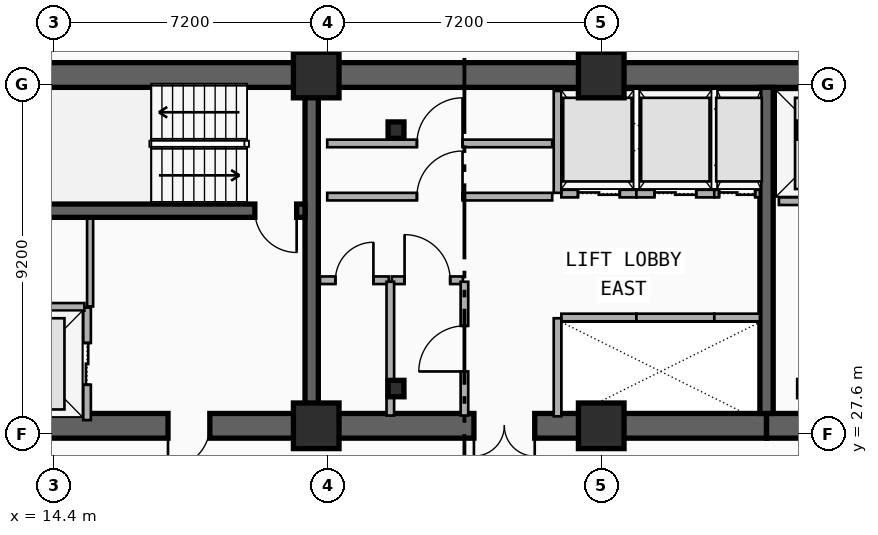
"""IFC4 building model, lengths in metres.
Left out: names, types, materials, properties, quantities, classifications, styles, units other than length and angle.
Written with IfcOpenShell. Run it as: python <this file> out.ifc"""

import sys

from ifc_helpers import new_model, si_unit, direction, frame, frame_2d, origin, origin_2d, place, context, subcontext, project, spatial, rectangle, i_section, extrude, element, fill, save


model = new_model("IFC4")
c1 = context("Model", 3, precision=1e-05, world=origin(), true_north=direction((0.0, 1.0)))
c2 = subcontext(c1, "Body", "Model", "MODEL_VIEW")
j1 = project(units=[si_unit("LENGTHUNIT", "METRE"), si_unit("PLANEANGLEUNIT", "RADIAN")], contexts=[c1])
p1 = place(None, origin())
s1 = spatial("IfcSite", under=j1, at=p1, CompositionType="ELEMENT")
p2 = place(p1, origin())
s2 = spatial("IfcBuilding", under=s1, at=p2, CompositionType="ELEMENT")
p3 = place(p2, frame((0.0, 0.0, 104.8)))
s3 = spatial("IfcBuildingStorey", under=s2, at=p3, CompositionType="ELEMENT", Elevation=104.8)
p4 = place(p3, frame((12.15, 37.05, 0.0), z_axis=(0.0, 0.0, 1.0), x_axis=(1.0, 0.0, 0.0)))
e1 = element("IfcWall", 1, at=p4, inside=s3, PredefinedType="SHEAR", context=c2, shape_type="SweptSolid", body=[
    extrude(rectangle(XDim=33.23, YDim=0.65, at=frame_2d((16.615, 0.0))), origin(), (0.0, 0.0, 1.0), 3.5),
])
p5 = place(p3, frame((21.18, 27.82, 0.0), z_axis=(0.0, 0.0, 1.0), x_axis=(-1.0, 0.0, 0.0)))
e2 = element("IfcWall", 2, at=p5, inside=s3, PredefinedType="SHEAR", context=c2, shape_type="SweptSolid", body=[
    extrude(rectangle(XDim=9.03, YDim=0.65, at=frame_2d((4.515, 0.0))), origin(), (0.0, 0.0, 1.0), 3.5),
])
p6 = place(p5, frame((2.68, 0.0, 0.0)))
e3 = element("IfcOpeningElement", 3, at=p6, cuts=e2, PredefinedType="OPENING", context=c2, shape_type="SweptSolid", body=[
    extrude(rectangle(XDim=1.1, YDim=2.15, at=frame_2d((0.55, 1.075))), frame((0.0, 0.335, 0.0), z_axis=(0.0, -1.0, 0.0), x_axis=(1.0, 0.0, 0.0)), (0.0, 0.0, 1.0), 0.67),
])
p7 = place(p3, frame((33.15, 27.82, 0.0), z_axis=(0.0, 0.0, 1.0), x_axis=(-1.0, 0.0, 0.0)))
e4 = element("IfcWall", 4, at=p7, inside=s3, PredefinedType="SHEAR", context=c2, shape_type="SweptSolid", body=[
    extrude(rectangle(XDim=11.97, YDim=0.65, at=frame_2d((5.985, 0.0))), origin(), (0.0, 0.0, 1.0), 3.5),
])
p8 = place(p7, frame((6.1, 0.0, 0.0)))
e5 = element("IfcOpeningElement", 5, at=p8, cuts=e4, PredefinedType="OPENING", context=c2, shape_type="SweptSolid", body=[
    extrude(rectangle(XDim=1.6, YDim=2.2, at=frame_2d((0.8, 1.1))), frame((0.0, 0.335, 0.0), z_axis=(0.0, -1.0, 0.0), x_axis=(1.0, 0.0, 0.0)), (0.0, 0.0, 1.0), 0.67),
])
p9 = place(p3, frame((45.38, 27.82, 0.0), z_axis=(0.0, 0.0, 1.0), x_axis=(-1.0, 0.0, 0.0)))
e6 = element("IfcWall", 6, at=p9, inside=s3, PredefinedType="SHEAR", context=c2, shape_type="SweptSolid", body=[
    extrude(rectangle(XDim=12.23, YDim=0.65, at=frame_2d((6.115, 0.0))), origin(), (0.0, 0.0, 1.0), 3.5),
])
p10 = place(p9, frame((9.93, 0.0, 0.0)))
e7 = element("IfcOpeningElement", 7, at=p10, cuts=e6, PredefinedType="OPENING", context=c2, shape_type="SweptSolid", body=[
    extrude(rectangle(XDim=1.1, YDim=2.15, at=frame_2d((0.55, 1.075))), frame((0.0, 0.335, 0.0), z_axis=(0.0, -1.0, 0.0), x_axis=(1.0, 0.0, 0.0)), (0.0, 0.0, 1.0), 0.67),
])
p11 = place(p9, frame((6.23, 0.0, 0.0)))
e8 = element("IfcOpeningElement", 8, at=p11, cuts=e6, PredefinedType="OPENING", context=c2, shape_type="SweptSolid", body=[
    extrude(rectangle(XDim=1.1, YDim=2.15, at=frame_2d((0.55, 1.075))), frame((0.0, 0.335, 0.0), z_axis=(0.0, -1.0, 0.0), x_axis=(1.0, 0.0, 0.0)), (0.0, 0.0, 1.0), 0.67),
])
for number, where, z_axis, x_axis in (
    (9, (21.18, 28.145, 0.0), (0.0, 0.0, 1.0), (0.0, 1.0, 0.0)),
    (10, (33.15, 28.145, 0.0), (0.0, 0.0, 1.0), (0.0, 1.0, 0.0)),
):
    element("IfcWall", number, at=place(p3, frame(where, z_axis=z_axis, x_axis=x_axis)), inside=s3, PredefinedType="SHEAR", context=c2, shape_type="SweptSolid", body=[
        extrude(rectangle(XDim=8.58, YDim=0.35, at=frame_2d((4.29, 0.0))), origin(), (0.0, 0.0, 1.0), 3.5),
    ])
p12 = place(p3, frame((21.005, 33.48, 0.0), z_axis=(0.0, 0.0, 1.0), x_axis=(-1.0, 0.0, 0.0)))
e11 = element("IfcWall", 11, at=p12, inside=s3, PredefinedType="SHEAR", context=c2, shape_type="SweptSolid", body=[
    extrude(rectangle(XDim=8.53, YDim=0.35, at=frame_2d((4.265, 0.0))), origin(), (0.0, 0.0, 1.0), 3.5),
])
p13 = place(p12, frame((0.22, 0.0, 0.0)))
e12 = element("IfcOpeningElement", 12, at=p13, cuts=e11, PredefinedType="OPENING", context=c2, shape_type="SweptSolid", body=[
    extrude(rectangle(XDim=1.1, YDim=2.15, at=frame_2d((0.55, 1.075))), frame((0.0, 0.185, 0.0), z_axis=(0.0, -1.0, 0.0), x_axis=(1.0, 0.0, 0.0)), (0.0, 0.0, 1.0), 0.37),
])
for number, where, z_axis, x_axis in (
    (13, (23.4, 28.8, 0.0), (0.0, 0.0, 1.0), (1.0, 0.0, 0.0)),
    (14, (23.4, 35.6, 0.0), (0.0, 0.0, 1.0), (1.0, 0.0, 0.0)),
):
    element("IfcColumn", number, at=place(p3, frame(where, z_axis=z_axis, x_axis=x_axis)), inside=s3, PredefinedType="COLUMN", context=c2, shape_type="SweptSolid", body=[
        extrude(i_section(OverallWidth=0.418, OverallDepth=0.432, WebThickness=0.035, FlangeThickness=0.056, FilletRadius=0.015, at=origin_2d()), origin(), (0.0, 0.0, 1.0), 3.5),
    ])
for number, where, z_axis, x_axis in (
    (15, (21.3, 27.82, 0.0), (0.0, 0.0, 1.0), (1.0, 0.0, 0.0)),
    (16, (21.3, 37.05, 0.0), (0.0, 0.0, 1.0), (1.0, 0.0, 0.0)),
    (17, (28.8, 27.82, 0.0), (0.0, 0.0, 1.0), (1.0, 0.0, 0.0)),
    (18, (28.8, 37.05, 0.0), (0.0, 0.0, 1.0), (1.0, 0.0, 0.0)),
):
    element("IfcColumn", number, at=place(p3, frame(where, z_axis=z_axis, x_axis=x_axis)), inside=s3, PredefinedType="COLUMN", context=c2, shape_type="SweptSolid", body=[
        extrude(rectangle(XDim=1.2, YDim=1.2, at=origin_2d()), origin(), (0.0, 0.0, 1.0), 3.5),
    ])
p14 = place(p3, frame((15.27, 27.97, 0.0), z_axis=(0.0, 0.0, 1.0), x_axis=(0.0, 1.0, 0.0)))
e19 = element("IfcWall", 19, at=p14, inside=s3, PredefinedType="PARTITIONING", context=c2, shape_type="SweptSolid", body=[
    extrude(rectangle(XDim=2.96, YDim=0.2, at=frame_2d((1.48, 0.0))), origin(), (0.0, 0.0, 1.0), 2.212),
])
p15 = place(p14, frame((0.93, 0.0, 0.0)))
e20 = element("IfcOpeningElement", 20, at=p15, cuts=e19, PredefinedType="OPENING", context=c2, shape_type="SweptSolid", body=[
    extrude(rectangle(XDim=1.1, YDim=2.15, at=frame_2d((0.55, 1.075))), frame((0.0, 0.11, 0.0), z_axis=(0.0, -1.0, 0.0), x_axis=(1.0, 0.0, 0.0)), (0.0, 0.0, 1.0), 0.22),
])
p16 = place(p3, frame((12.45, 30.95, 0.0), z_axis=(0.0, 0.0, 1.0), x_axis=(1.0, 0.0, 0.0)))
e21 = element("IfcWall", 21, at=p16, inside=s3, PredefinedType="PARTITIONING", context=c2, shape_type="SweptSolid", body=[
    extrude(rectangle(XDim=2.75, YDim=0.2, at=frame_2d((1.375, 0.0))), origin(), (0.0, 0.0, 1.0), 2.212),
])
p17 = place(p3, frame((33.475, 33.73, 0.0), z_axis=(0.0, 0.0, 1.0), x_axis=(1.0, 0.0, 0.0)))
e22 = element("IfcWall", 22, at=p17, inside=s3, PredefinedType="PARTITIONING", context=c2, shape_type="SweptSolid", body=[
    extrude(rectangle(XDim=2.725, YDim=0.2, at=frame_2d((1.362, 0.0))), origin(), (0.0, 0.0, 1.0), 2.212),
])
p18 = place(p17, frame((0.812, 0.0, 0.0)))
e23 = element("IfcOpeningElement", 23, at=p18, cuts=e22, PredefinedType="OPENING", context=c2, shape_type="SweptSolid", body=[
    extrude(rectangle(XDim=1.1, YDim=2.15, at=frame_2d((0.55, 1.075))), frame((0.0, 0.11, 0.0), z_axis=(0.0, -1.0, 0.0), x_axis=(1.0, 0.0, 0.0)), (0.0, 0.0, 1.0), 0.22),
])
p19 = place(p3, frame((27.75, 30.67, 0.0), z_axis=(0.0, 0.0, 1.0), x_axis=(1.0, 0.0, 0.0)))
e24 = element("IfcWall", 24, at=p19, inside=s3, PredefinedType="PARTITIONING", context=c2, shape_type="SweptSolid", body=[
    extrude(rectangle(XDim=1.975, YDim=0.2, at=frame_2d((0.988, 0.0))), origin(), (0.0, 0.0, 1.0), 2.212),
])
p20 = place(p3, frame((27.65, 28.07, 0.0), z_axis=(0.0, 0.0, 1.0), x_axis=(0.0, 1.0, 0.0)))
e25 = element("IfcWall", 25, at=p20, inside=s3, PredefinedType="PARTITIONING", context=c2, shape_type="SweptSolid", body=[
    extrude(rectangle(XDim=2.58, YDim=0.2, at=frame_2d((1.29, 0.0))), origin(), (0.0, 0.0, 1.0), 2.212),
])
p21 = place(p3, frame((29.725, 30.67, 0.0), z_axis=(0.0, 0.0, 1.0), x_axis=(1.0, 0.0, 0.0)))
e26 = element("IfcWall", 26, at=p21, inside=s3, PredefinedType="PARTITIONING", context=c2, shape_type="SweptSolid", body=[
    extrude(rectangle(XDim=2.05, YDim=0.2, at=frame_2d((1.025, 0.0))), origin(), (0.0, 0.0, 1.0), 2.62),
])
p22 = place(p3, frame((31.775, 30.67, 0.0), z_axis=(0.0, 0.0, 1.0), x_axis=(1.0, 0.0, 0.0)))
e27 = element("IfcWall", 27, at=p22, inside=s3, PredefinedType="PARTITIONING", context=c2, shape_type="SweptSolid", body=[
    extrude(rectangle(XDim=1.2, YDim=0.2, at=frame_2d((0.6, 0.0))), origin(), (0.0, 0.0, 1.0), 2.62),
])
p23 = place(p3, frame((27.75, 33.93, 0.0), z_axis=(0.0, 0.0, 1.0), x_axis=(1.0, 0.0, 0.0)))
e28 = element("IfcWall", 28, at=p23, inside=s3, PredefinedType="PARTITIONING", context=c2, shape_type="SweptSolid", body=[
    extrude(rectangle(XDim=1.975, YDim=0.2, at=frame_2d((0.988, 0.0))), origin(), (0.0, 0.0, 1.0), 2.212),
])
p24 = place(p23, frame((0.438, 0.0, 0.0)))
e29 = element("IfcOpeningElement", 29, at=p24, cuts=e28, PredefinedType="OPENING", context=c2, shape_type="SweptSolid", body=[
    extrude(rectangle(XDim=1.1, YDim=2.15, at=frame_2d((0.55, 1.075))), frame((0.0, 0.11, 0.0), z_axis=(0.0, -1.0, 0.0), x_axis=(1.0, 0.0, 0.0)), (0.0, 0.0, 1.0), 0.22),
])
p25 = place(p3, frame((27.65, 33.95, 0.0), z_axis=(0.0, 0.0, 1.0), x_axis=(0.0, 1.0, 0.0)))
e30 = element("IfcWall", 30, at=p25, inside=s3, PredefinedType="PARTITIONING", context=c2, shape_type="SweptSolid", body=[
    extrude(rectangle(XDim=2.68, YDim=0.2, at=frame_2d((1.34, 0.0))), origin(), (0.0, 0.0, 1.0), 2.212),
])
p26 = place(p3, frame((29.725, 33.93, 0.0), z_axis=(0.0, 0.0, 1.0), x_axis=(1.0, 0.0, 0.0)))
e31 = element("IfcWall", 31, at=p26, inside=s3, PredefinedType="PARTITIONING", context=c2, shape_type="SweptSolid", body=[
    extrude(rectangle(XDim=2.05, YDim=0.2, at=frame_2d((1.025, 0.0))), origin(), (0.0, 0.0, 1.0), 3.24),
])
p27 = place(p26, frame((0.475, 0.0, 0.0)))
e32 = element("IfcOpeningElement", 32, at=p27, cuts=e31, PredefinedType="OPENING", context=c2, shape_type="SweptSolid", body=[
    extrude(rectangle(XDim=1.1, YDim=2.15, at=frame_2d((0.55, 1.075))), frame((0.0, 0.11, 0.0), z_axis=(0.0, -1.0, 0.0), x_axis=(1.0, 0.0, 0.0)), (0.0, 0.0, 1.0), 0.22),
])
p28 = place(p3, frame((31.775, 33.93, 0.0), z_axis=(0.0, 0.0, 1.0), x_axis=(1.0, 0.0, 0.0)))
e33 = element("IfcWall", 33, at=p28, inside=s3, PredefinedType="PARTITIONING", context=c2, shape_type="SweptSolid", body=[
    extrude(rectangle(XDim=1.2, YDim=0.2, at=frame_2d((0.6, 0.0))), origin(), (0.0, 0.0, 1.0), 3.24),
])
p29 = place(p28, frame((0.125, 0.0, 0.0)))
e34 = element("IfcOpeningElement", 34, at=p29, cuts=e33, PredefinedType="OPENING", context=c2, shape_type="SweptSolid", body=[
    extrude(rectangle(XDim=0.95, YDim=2.15, at=frame_2d((0.475, 1.075))), frame((0.0, 0.11, 0.0), z_axis=(0.0, -1.0, 0.0), x_axis=(1.0, 0.0, 0.0)), (0.0, 0.0, 1.0), 0.22),
])
p30 = place(p3, frame((21.4, 31.65, 0.0), z_axis=(0.0, 0.0, 1.0), x_axis=(1.0, 0.0, 0.0)))
e35 = element("IfcWall", 35, at=p30, inside=s3, PredefinedType="PARTITIONING", context=c2, shape_type="SweptSolid", body=[
    extrude(rectangle(XDim=1.81, YDim=0.2, at=frame_2d((0.905, 0.0))), origin(), (0.0, 0.0, 1.0), 2.28),
])
p31 = place(p30, frame((0.405, 0.0, 0.0)))
e36 = element("IfcOpeningElement", 36, at=p31, cuts=e35, PredefinedType="OPENING", context=c2, shape_type="SweptSolid", body=[
    extrude(rectangle(XDim=1.0, YDim=2.15, at=frame_2d((0.5, 1.075))), frame((0.0, 0.11, 0.0), z_axis=(0.0, -1.0, 0.0), x_axis=(1.0, 0.0, 0.0)), (0.0, 0.0, 1.0), 0.22),
])
p32 = place(p3, frame((23.29, 31.65, 0.0), z_axis=(0.0, 0.0, 1.0), x_axis=(1.0, 0.0, 0.0)))
e37 = element("IfcWall", 37, at=p32, inside=s3, PredefinedType="PARTITIONING", context=c2, shape_type="SweptSolid", body=[
    extrude(rectangle(XDim=1.87, YDim=0.2, at=frame_2d((0.935, 0.0))), origin(), (0.0, 0.0, 1.0), 3.24),
])
p33 = place(p32, frame((0.335, 0.0, 0.0)))
e38 = element("IfcOpeningElement", 38, at=p33, cuts=e37, PredefinedType="OPENING", context=c2, shape_type="SweptSolid", body=[
    extrude(rectangle(XDim=1.2, YDim=2.15, at=frame_2d((0.6, 1.075))), frame((0.0, 0.11, 0.0), z_axis=(0.0, -1.0, 0.0), x_axis=(1.0, 0.0, 0.0)), (0.0, 0.0, 1.0), 0.22),
])
p34 = place(p3, frame((21.59, 33.85, 0.0), z_axis=(0.0, 0.0, 1.0), x_axis=(1.0, 0.0, 0.0)))
e39 = element("IfcWall", 39, at=p34, inside=s3, PredefinedType="PARTITIONING", context=c2, shape_type="SweptSolid", body=[
    extrude(rectangle(XDim=5.92, YDim=0.2, at=frame_2d((2.96, 0.0))), origin(), (0.0, 0.0, 1.0), 2.28),
])
p35 = place(p34, frame((2.36, 0.0, 0.0)))
e40 = element("IfcOpeningElement", 40, at=p35, cuts=e39, PredefinedType="OPENING", context=c2, shape_type="SweptSolid", body=[
    extrude(rectangle(XDim=1.2, YDim=2.15, at=frame_2d((0.6, 1.075))), frame((0.0, 0.11, 0.0), z_axis=(0.0, -1.0, 0.0), x_axis=(1.0, 0.0, 0.0)), (0.0, 0.0, 1.0), 0.22),
])
p36 = place(p3, frame((25.2, 28.09, 0.0), z_axis=(0.0, 0.0, 1.0), x_axis=(0.0, 1.0, 0.0)))
e41 = element("IfcWall", 41, at=p36, inside=s3, PredefinedType="PARTITIONING", context=c2, shape_type="SweptSolid", body=[
    extrude(rectangle(XDim=3.52, YDim=0.2, at=frame_2d((1.76, 0.0))), origin(), (0.0, 0.0, 1.0), 2.62),
])
p37 = place(p36, frame((1.16, 0.0, 0.0)))
e42 = element("IfcOpeningElement", 42, at=p37, cuts=e41, PredefinedType="OPENING", context=c2, shape_type="SweptSolid", body=[
    extrude(rectangle(XDim=1.2, YDim=2.15, at=frame_2d((0.6, 1.075))), frame((0.0, 0.11, 0.0), z_axis=(0.0, -1.0, 0.0), x_axis=(1.0, 0.0, 0.0)), (0.0, 0.0, 1.0), 0.22),
])
p38 = place(p3, frame((23.25, 28.09, 0.0), z_axis=(0.0, 0.0, 1.0), x_axis=(0.0, 1.0, 0.0)))
e43 = element("IfcWall", 43, at=p38, inside=s3, PredefinedType="PARTITIONING", context=c2, shape_type="SweptSolid", body=[
    extrude(rectangle(XDim=3.52, YDim=0.2, at=frame_2d((1.76, 0.0))), origin(), (0.0, 0.0, 1.0), 2.62),
])
p39 = place(p3, frame((21.59, 35.25, 0.0), z_axis=(0.0, 0.0, 1.0), x_axis=(1.0, 0.0, 0.0)))
e44 = element("IfcWall", 44, at=p39, inside=s3, PredefinedType="PARTITIONING", context=c2, shape_type="SweptSolid", body=[
    extrude(rectangle(XDim=5.92, YDim=0.2, at=frame_2d((2.96, 0.0))), origin(), (0.0, 0.0, 1.0), 2.28),
])
p40 = place(p39, frame((2.36, 0.0, 0.0)))
e45 = element("IfcOpeningElement", 45, at=p40, cuts=e44, PredefinedType="OPENING", context=c2, shape_type="SweptSolid", body=[
    extrude(rectangle(XDim=1.2, YDim=2.15, at=frame_2d((0.6, 1.075))), frame((0.0, 0.11, 0.0), z_axis=(0.0, -1.0, 0.0), x_axis=(1.0, 0.0, 0.0)), (0.0, 0.0, 1.0), 0.22),
])
p41 = place(p3, frame((15.35, 30.96, 0.0), z_axis=(0.0, 0.0, 1.0), x_axis=(0.0, 1.0, 0.0)))
e46 = element("IfcWall", 46, at=p41, inside=s3, PredefinedType="PARTITIONING", context=c2, shape_type="SweptSolid", body=[
    extrude(rectangle(XDim=2.31, YDim=0.16, at=frame_2d((1.155, 0.0))), origin(), (0.0, 0.0, 1.0), 3.24),
])
p42 = place(p15, origin())
e47 = element("IfcDoor", 47, at=p42, inside=s3, OperationType="DOUBLE_DOOR_SLIDING", PredefinedType="DOOR", context=c2, shape_type="SweptSolid", body=[
    extrude(rectangle(XDim=1.1, YDim=2.15, at=frame_2d((0.55, 1.075))), frame((0.0, 0.025, 0.0), z_axis=(0.0, -1.0, 0.0), x_axis=(1.0, 0.0, 0.0)), (0.0, 0.0, 1.0), 0.05),
])
fill(e20, e47)
p43 = place(p24, origin())
e48 = element("IfcDoor", 48, at=p43, inside=s3, OperationType="DOUBLE_DOOR_SLIDING", PredefinedType="DOOR", context=c2, shape_type="SweptSolid", body=[
    extrude(rectangle(XDim=1.1, YDim=2.15, at=frame_2d((0.55, 1.075))), frame((0.0, 0.025, 0.0), z_axis=(0.0, -1.0, 0.0), x_axis=(1.0, 0.0, 0.0)), (0.0, 0.0, 1.0), 0.05),
])
fill(e29, e48)
p44 = place(p27, origin())
e49 = element("IfcDoor", 49, at=p44, inside=s3, OperationType="DOUBLE_DOOR_SLIDING", PredefinedType="DOOR", context=c2, shape_type="SweptSolid", body=[
    extrude(rectangle(XDim=1.1, YDim=2.15, at=frame_2d((0.55, 1.075))), frame((0.0, 0.025, 0.0), z_axis=(0.0, -1.0, 0.0), x_axis=(1.0, 0.0, 0.0)), (0.0, 0.0, 1.0), 0.05),
])
fill(e32, e49)
p45 = place(p29, origin())
e50 = element("IfcDoor", 50, at=p45, inside=s3, OperationType="DOUBLE_DOOR_SLIDING", PredefinedType="DOOR", context=c2, shape_type="SweptSolid", body=[
    extrude(rectangle(XDim=0.95, YDim=2.15, at=frame_2d((0.475, 1.075))), frame((0.0, 0.025, 0.0), z_axis=(0.0, -1.0, 0.0), x_axis=(1.0, 0.0, 0.0)), (0.0, 0.0, 1.0), 0.05),
])
fill(e34, e50)
p46 = place(p13, origin())
e51 = element("IfcDoor", 51, at=p46, inside=s3, OperationType="SINGLE_SWING_LEFT", PredefinedType="DOOR", context=c2, shape_type="SweptSolid", body=[
    extrude(rectangle(XDim=1.1, YDim=2.15, at=frame_2d((0.55, 1.075))), frame((0.0, 0.025, 0.0), z_axis=(0.0, -1.0, 0.0), x_axis=(1.0, 0.0, 0.0)), (0.0, 0.0, 1.0), 0.05),
])
fill(e12, e51)
p47 = place(p6, origin())
e52 = element("IfcDoor", 52, at=p47, inside=s3, OperationType="SINGLE_SWING_RIGHT", PredefinedType="DOOR", context=c2, shape_type="SweptSolid", body=[
    extrude(rectangle(XDim=1.1, YDim=2.15, at=frame_2d((0.55, 1.075))), frame((0.0, 0.025, 0.0), z_axis=(0.0, -1.0, 0.0), x_axis=(1.0, 0.0, 0.0)), (0.0, 0.0, 1.0), 0.05),
])
fill(e3, e52)
p48 = place(p8, origin())
e53 = element("IfcDoor", 53, at=p48, inside=s3, OperationType="SINGLE_SWING_LEFT", PredefinedType="DOOR", context=c2, shape_type="SweptSolid", body=[
    extrude(rectangle(XDim=1.6, YDim=2.2, at=frame_2d((0.8, 1.1))), frame((0.0, 0.025, 0.0), z_axis=(0.0, -1.0, 0.0), x_axis=(1.0, 0.0, 0.0)), (0.0, 0.0, 1.0), 0.05),
])
fill(e5, e53)
p49 = place(p31, origin())
e54 = element("IfcDoor", 54, at=p49, inside=s3, OperationType="SINGLE_SWING_RIGHT", PredefinedType="DOOR", context=c2, shape_type="SweptSolid", body=[
    extrude(rectangle(XDim=1.0, YDim=2.15, at=frame_2d((0.5, 1.075))), frame((0.0, 0.025, 0.0), z_axis=(0.0, -1.0, 0.0), x_axis=(1.0, 0.0, 0.0)), (0.0, 0.0, 1.0), 0.05),
])
fill(e36, e54)
p50 = place(p33, origin())
e55 = element("IfcDoor", 55, at=p50, inside=s3, OperationType="SINGLE_SWING_LEFT", PredefinedType="DOOR", context=c2, shape_type="SweptSolid", body=[
    extrude(rectangle(XDim=1.2, YDim=2.15, at=frame_2d((0.6, 1.075))), frame((0.0, 0.025, 0.0), z_axis=(0.0, -1.0, 0.0), x_axis=(1.0, 0.0, 0.0)), (0.0, 0.0, 1.0), 0.05),
])
fill(e38, e55)
p51 = place(p35, origin())
e56 = element("IfcDoor", 56, at=p51, inside=s3, OperationType="SINGLE_SWING_RIGHT", PredefinedType="DOOR", context=c2, shape_type="SweptSolid", body=[
    extrude(rectangle(XDim=1.2, YDim=2.15, at=frame_2d((0.6, 1.075))), frame((0.0, 0.025, 0.0), z_axis=(0.0, -1.0, 0.0), x_axis=(1.0, 0.0, 0.0)), (0.0, 0.0, 1.0), 0.05),
])
fill(e40, e56)
p52 = place(p37, origin())
e57 = element("IfcDoor", 57, at=p52, inside=s3, OperationType="SINGLE_SWING_LEFT", PredefinedType="DOOR", context=c2, shape_type="SweptSolid", body=[
    extrude(rectangle(XDim=1.2, YDim=2.15, at=frame_2d((0.6, 1.075))), frame((0.0, 0.025, 0.0), z_axis=(0.0, -1.0, 0.0), x_axis=(1.0, 0.0, 0.0)), (0.0, 0.0, 1.0), 0.05),
])
fill(e42, e57)
p53 = place(p40, origin())
e58 = element("IfcDoor", 58, at=p53, inside=s3, OperationType="SINGLE_SWING_RIGHT", PredefinedType="DOOR", context=c2, shape_type="SweptSolid", body=[
    extrude(rectangle(XDim=1.2, YDim=2.15, at=frame_2d((0.6, 1.075))), frame((0.0, 0.025, 0.0), z_axis=(0.0, -1.0, 0.0), x_axis=(1.0, 0.0, 0.0)), (0.0, 0.0, 1.0), 0.05),
])
fill(e45, e58)
save(model, sys.argv[1])
